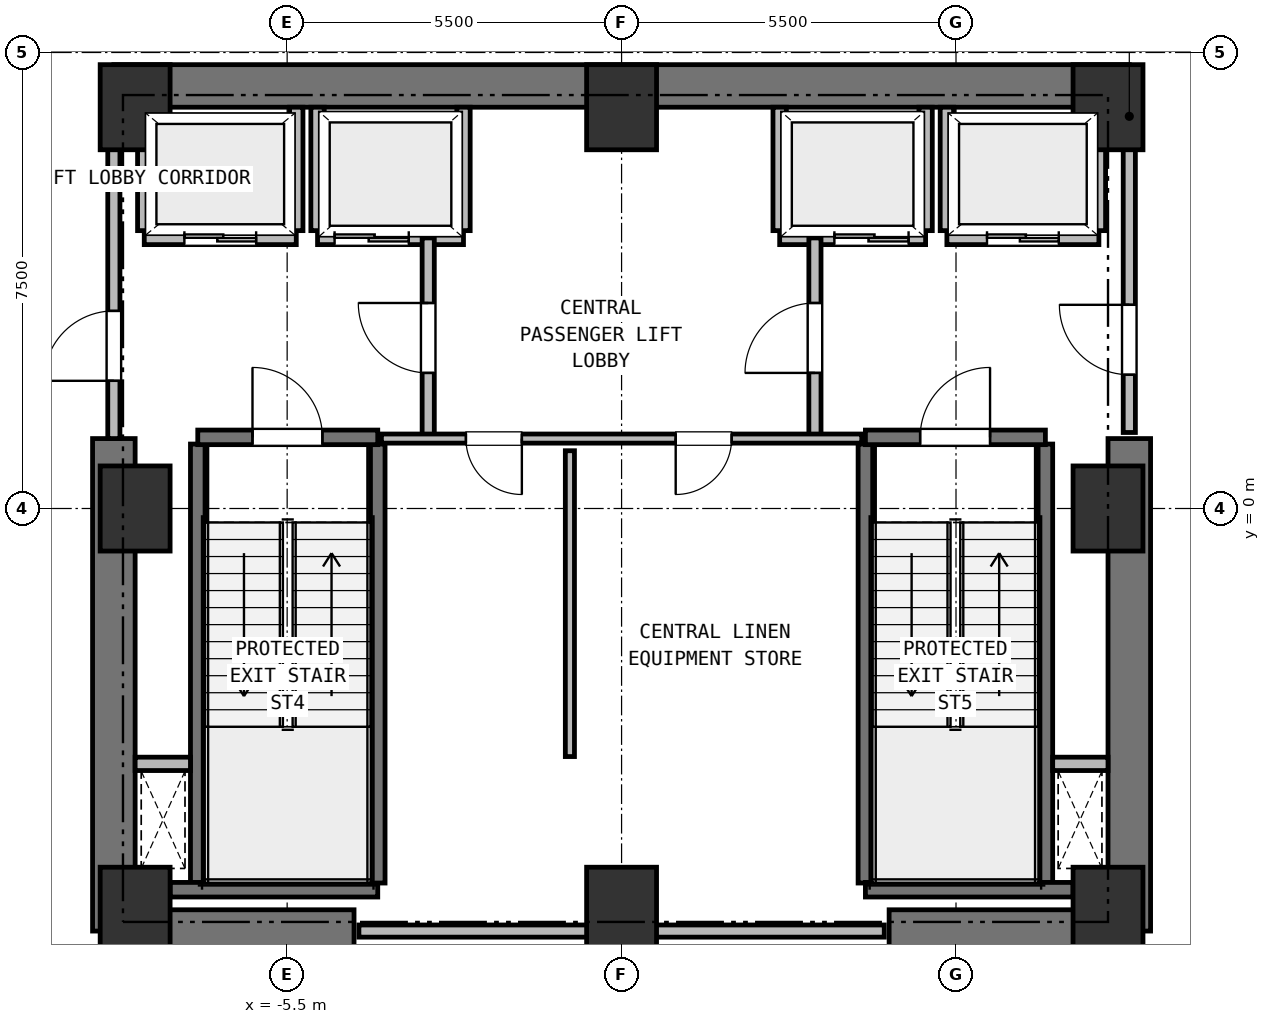
"""IFC4 building model, lengths in metres.
Left out: names, types, materials, properties, quantities, classifications, styles, units other than length and angle.
Written with IfcOpenShell. Run it as: python <this file> out.ifc"""

import sys

from ifc_helpers import new_model, si_unit, direction, frame, frame_2d, origin, origin_2d, place, context, subcontext, project, spatial, rectangle, extrude, element, fill, save


model = new_model("IFC4")
c1 = context("Model", 3, precision=1e-05, world=origin(), true_north=direction((0.0, 1.0)))
c2 = subcontext(c1, "Body", "Model", "MODEL_VIEW")
j1 = project(units=[si_unit("LENGTHUNIT", "METRE"), si_unit("PLANEANGLEUNIT", "RADIAN")], contexts=[c1])
p1 = place(None, origin())
s1 = spatial("IfcSite", under=j1, at=p1, CompositionType="ELEMENT")
p2 = place(p1, origin())
s2 = spatial("IfcBuilding", under=s1, at=p2, CompositionType="ELEMENT")
p3 = place(p2, frame((0.0, 0.0, -9.0)))
s3 = spatial("IfcBuildingStorey", under=s2, at=p3, CompositionType="ELEMENT", Elevation=-9.0)
for number, where, z_axis, x_axis in (
    (1, (-8.0, -6.6, 0.0), (0.0, 0.0, 1.0), (1.0, 0.0, 0.0)),
    (2, (0.0, -6.6, 0.0), (0.0, 0.0, 1.0), (1.0, 0.0, 0.0)),
    (3, (8.0, -6.6, 0.0), (0.0, 0.0, 1.0), (1.0, 0.0, 0.0)),
    (4, (8.0, 0.0, 0.0), (0.0, 0.0, 1.0), (1.0, 0.0, 0.0)),
    (5, (8.0, 6.6, 0.0), (0.0, 0.0, 1.0), (1.0, 0.0, 0.0)),
    (6, (0.0, 6.6, 0.0), (0.0, 0.0, 1.0), (1.0, 0.0, 0.0)),
    (7, (-8.0, 6.6, 0.0), (0.0, 0.0, 1.0), (1.0, 0.0, 0.0)),
    (8, (-8.0, 0.0, 0.0), (0.0, 0.0, 1.0), (1.0, 0.0, 0.0)),
):
    element("IfcColumn", number, at=place(p3, frame(where, z_axis=z_axis, x_axis=x_axis)), inside=s3, PredefinedType="COLUMN", context=c2, shape_type="SweptSolid", body=[
        extrude(rectangle(XDim=1.15, YDim=1.4, at=origin_2d()), origin(), (0.0, 0.0, 1.0), 4.5),
    ])
p4 = place(p3, frame((-8.35, 6.95, 0.0), z_axis=(0.0, 0.0, 1.0), x_axis=(1.0, 0.0, 0.0)))
e9 = element("IfcWall", 9, at=p4, inside=s3, PredefinedType="SHEAR", context=c2, shape_type="SweptSolid", body=[
    extrude(rectangle(XDim=16.7, YDim=0.7, at=frame_2d((8.35, 0.0))), origin(), (0.0, 0.0, 1.0), 4.2),
])
for number, where, z_axis, x_axis in (
    (10, (-8.35, -6.95, 0.0), (0.0, 0.0, 1.0), (1.0, 0.0, 0.0)),
    (11, (4.4, -6.95, 0.0), (0.0, 0.0, 1.0), (1.0, 0.0, 0.0)),
):
    element("IfcWall", number, at=place(p3, frame(where, z_axis=z_axis, x_axis=x_axis)), inside=s3, PredefinedType="SHEAR", context=c2, shape_type="SweptSolid", body=[
        extrude(rectangle(XDim=3.95, YDim=0.7, at=frame_2d((1.975, 0.0))), origin(), (0.0, 0.0, 1.0), 4.2),
    ])
for number, where, z_axis, x_axis in (
    (12, (-8.35, -6.95, 0.0), (0.0, 0.0, 1.0), (0.0, 1.0, 0.0)),
    (13, (8.35, -6.95, 0.0), (0.0, 0.0, 1.0), (0.0, 1.0, 0.0)),
):
    element("IfcWall", number, at=place(p3, frame(where, z_axis=z_axis, x_axis=x_axis)), inside=s3, PredefinedType="SHEAR", context=c2, shape_type="SweptSolid", body=[
        extrude(rectangle(XDim=8.1, YDim=0.7, at=frame_2d((4.05, 0.0))), origin(), (0.0, 0.0, 1.0), 4.2),
    ])
p5 = place(p3, frame((-6.97, -6.16, 0.0), z_axis=(0.0, 0.0, 1.0), x_axis=(0.0, 1.0, 0.0)))
e14 = element("IfcWall", 14, at=p5, inside=s3, PredefinedType="SHEAR", context=c2, shape_type="SweptSolid", body=[
    extrude(rectangle(XDim=7.22, YDim=0.24, at=frame_2d((3.61, 0.0))), origin(), (0.0, 0.0, 1.0), 4.2),
])
p6 = place(p3, frame((-7.425, -6.27, 0.0), z_axis=(0.0, 0.0, 1.0), x_axis=(1.0, 0.0, 0.0)))
e15 = element("IfcWall", 15, at=p6, inside=s3, PredefinedType="SHEAR", context=c2, shape_type="SweptSolid", body=[
    extrude(rectangle(XDim=3.415, YDim=0.24, at=frame_2d((1.708, 0.0))), origin(), (0.0, 0.0, 1.0), 4.2),
])
p7 = place(p3, frame((-4.01, -6.16, 0.0), z_axis=(0.0, 0.0, 1.0), x_axis=(0.0, 1.0, 0.0)))
e16 = element("IfcWall", 16, at=p7, inside=s3, PredefinedType="SHEAR", context=c2, shape_type="SweptSolid", body=[
    extrude(rectangle(XDim=7.22, YDim=0.24, at=frame_2d((3.61, 0.0))), origin(), (0.0, 0.0, 1.0), 4.2),
])
p8 = place(p3, frame((-6.97, 1.17, 0.0), z_axis=(0.0, 0.0, 1.0), x_axis=(1.0, 0.0, 0.0)))
e17 = element("IfcWall", 17, at=p8, inside=s3, PredefinedType="SHEAR", context=c2, shape_type="SweptSolid", body=[
    extrude(rectangle(XDim=2.96, YDim=0.24, at=frame_2d((1.48, 0.0))), origin(), (0.0, 0.0, 1.0), 4.2),
])
p9 = place(p8, frame((0.9, 0.0, 0.0)))
e18 = element("IfcOpeningElement", 18, at=p9, cuts=e17, PredefinedType="OPENING", context=c2, shape_type="SweptSolid", body=[
    extrude(rectangle(XDim=1.15, YDim=2.15, at=frame_2d((0.575, 1.075))), frame((0.0, 0.13, 0.0), z_axis=(0.0, -1.0, 0.0), x_axis=(1.0, 0.0, 0.0)), (0.0, 0.0, 1.0), 0.26),
])
for number, where, z_axis, x_axis in (
    (19, (4.01, -6.16, 0.0), (0.0, 0.0, 1.0), (0.0, 1.0, 0.0)),
    (20, (6.97, -6.16, 0.0), (0.0, 0.0, 1.0), (0.0, 1.0, 0.0)),
):
    element("IfcWall", number, at=place(p3, frame(where, z_axis=z_axis, x_axis=x_axis)), inside=s3, PredefinedType="SHEAR", context=c2, shape_type="SweptSolid", body=[
        extrude(rectangle(XDim=7.22, YDim=0.24, at=frame_2d((3.61, 0.0))), origin(), (0.0, 0.0, 1.0), 4.2),
    ])
p10 = place(p3, frame((4.01, -6.27, 0.0), z_axis=(0.0, 0.0, 1.0), x_axis=(1.0, 0.0, 0.0)))
e21 = element("IfcWall", 21, at=p10, inside=s3, PredefinedType="SHEAR", context=c2, shape_type="SweptSolid", body=[
    extrude(rectangle(XDim=3.415, YDim=0.24, at=frame_2d((1.708, 0.0))), origin(), (0.0, 0.0, 1.0), 4.2),
])
p11 = place(p3, frame((4.01, 1.17, 0.0), z_axis=(0.0, 0.0, 1.0), x_axis=(1.0, 0.0, 0.0)))
e22 = element("IfcWall", 22, at=p11, inside=s3, PredefinedType="SHEAR", context=c2, shape_type="SweptSolid", body=[
    extrude(rectangle(XDim=2.96, YDim=0.24, at=frame_2d((1.48, 0.0))), origin(), (0.0, 0.0, 1.0), 4.2),
])
p12 = place(p11, frame((0.9, 0.0, 0.0)))
e23 = element("IfcOpeningElement", 23, at=p12, cuts=e22, PredefinedType="OPENING", context=c2, shape_type="SweptSolid", body=[
    extrude(rectangle(XDim=1.15, YDim=2.15, at=frame_2d((0.575, 1.075))), frame((0.0, 0.13, 0.0), z_axis=(0.0, -1.0, 0.0), x_axis=(1.0, 0.0, 0.0)), (0.0, 0.0, 1.0), 0.26),
])
for number, where, z_axis, x_axis in (
    (24, (-8.0, -4.2, 0.0), (0.0, 0.0, 1.0), (1.0, 0.0, 0.0)),
    (25, (7.09, -4.2, 0.0), (0.0, 0.0, 1.0), (1.0, 0.0, 0.0)),
):
    element("IfcWall", number, at=place(p3, frame(where, z_axis=z_axis, x_axis=x_axis)), inside=s3, PredefinedType="PARTITIONING", context=c2, shape_type="SweptSolid", body=[
        extrude(rectangle(XDim=0.91, YDim=0.22, at=frame_2d((0.455, 0.0))), origin(), (0.0, 0.0, 1.0), 4.2),
    ])
p13 = place(p3, frame((-7.85, 4.45, 0.0), z_axis=(0.0, 0.0, 1.0), x_axis=(1.0, 0.0, 0.0)))
e26 = element("IfcWall", 26, at=p13, inside=s3, PredefinedType="PARTITIONING", context=c2, shape_type="SweptSolid", body=[
    extrude(rectangle(XDim=2.5, YDim=0.22, at=frame_2d((1.25, 0.0))), origin(), (0.0, 0.0, 1.0), 4.2),
])
p14 = place(p13, frame((0.66, 0.0, 0.0)))
e27 = element("IfcOpeningElement", 27, at=p14, cuts=e26, PredefinedType="OPENING", context=c2, shape_type="SweptSolid", body=[
    extrude(rectangle(XDim=1.18, YDim=2.15, at=frame_2d((0.59, 1.075))), frame((0.0, 0.12, 0.0), z_axis=(0.0, -1.0, 0.0), x_axis=(1.0, 0.0, 0.0)), (0.0, 0.0, 1.0), 0.24),
])
p15 = place(p3, frame((-7.85, 4.57, 0.0), z_axis=(0.0, 0.0, 1.0), x_axis=(0.0, 1.0, 0.0)))
e28 = element("IfcWall", 28, at=p15, inside=s3, PredefinedType="PARTITIONING", context=c2, shape_type="SweptSolid", body=[
    extrude(rectangle(XDim=2.03, YDim=0.22, at=frame_2d((1.015, 0.0))), origin(), (0.0, 0.0, 1.0), 3.78),
])
p16 = place(p3, frame((-5.35, 4.57, 0.0), z_axis=(0.0, 0.0, 1.0), x_axis=(0.0, 1.0, 0.0)))
e29 = element("IfcWall", 29, at=p16, inside=s3, PredefinedType="PARTITIONING", context=c2, shape_type="SweptSolid", body=[
    extrude(rectangle(XDim=2.03, YDim=0.22, at=frame_2d((1.015, 0.0))), origin(), (0.0, 0.0, 1.0), 4.2),
])
p17 = place(p3, frame((5.35, 4.45, 0.0), z_axis=(0.0, 0.0, 1.0), x_axis=(1.0, 0.0, 0.0)))
e30 = element("IfcWall", 30, at=p17, inside=s3, PredefinedType="PARTITIONING", context=c2, shape_type="SweptSolid", body=[
    extrude(rectangle(XDim=2.5, YDim=0.22, at=frame_2d((1.25, 0.0))), origin(), (0.0, 0.0, 1.0), 4.2),
])
p18 = place(p17, frame((0.66, 0.0, 0.0)))
e31 = element("IfcOpeningElement", 31, at=p18, cuts=e30, PredefinedType="OPENING", context=c2, shape_type="SweptSolid", body=[
    extrude(rectangle(XDim=1.18, YDim=2.15, at=frame_2d((0.59, 1.075))), frame((0.0, 0.12, 0.0), z_axis=(0.0, -1.0, 0.0), x_axis=(1.0, 0.0, 0.0)), (0.0, 0.0, 1.0), 0.24),
])
p19 = place(p3, frame((5.35, 4.57, 0.0), z_axis=(0.0, 0.0, 1.0), x_axis=(0.0, 1.0, 0.0)))
e32 = element("IfcWall", 32, at=p19, inside=s3, PredefinedType="PARTITIONING", context=c2, shape_type="SweptSolid", body=[
    extrude(rectangle(XDim=2.03, YDim=0.22, at=frame_2d((1.015, 0.0))), origin(), (0.0, 0.0, 1.0), 4.2),
])
p20 = place(p3, frame((7.85, 4.57, 0.0), z_axis=(0.0, 0.0, 1.0), x_axis=(0.0, 1.0, 0.0)))
e33 = element("IfcWall", 33, at=p20, inside=s3, PredefinedType="PARTITIONING", context=c2, shape_type="SweptSolid", body=[
    extrude(rectangle(XDim=2.03, YDim=0.22, at=frame_2d((1.015, 0.0))), origin(), (0.0, 0.0, 1.0), 3.78),
])
p21 = place(p3, frame((-5.0, 4.45, 0.0), z_axis=(0.0, 0.0, 1.0), x_axis=(1.0, 0.0, 0.0)))
e34 = element("IfcWall", 34, at=p21, inside=s3, PredefinedType="PARTITIONING", context=c2, shape_type="SweptSolid", body=[
    extrude(rectangle(XDim=2.4, YDim=0.22, at=frame_2d((1.2, 0.0))), origin(), (0.0, 0.0, 1.0), 4.2),
])
p22 = place(p21, frame((0.28, 0.0, 0.0)))
e35 = element("IfcOpeningElement", 35, at=p22, cuts=e34, PredefinedType="OPENING", context=c2, shape_type="SweptSolid", body=[
    extrude(rectangle(XDim=1.22, YDim=2.15, at=frame_2d((0.61, 1.075))), frame((0.0, 0.12, 0.0), z_axis=(0.0, -1.0, 0.0), x_axis=(1.0, 0.0, 0.0)), (0.0, 0.0, 1.0), 0.24),
])
for number, where, z_axis, x_axis in (
    (36, (-5.0, 4.57, 0.0), (0.0, 0.0, 1.0), (0.0, 1.0, 0.0)),
    (37, (-2.6, 4.57, 0.0), (0.0, 0.0, 1.0), (0.0, 1.0, 0.0)),
):
    element("IfcWall", number, at=place(p3, frame(where, z_axis=z_axis, x_axis=x_axis)), inside=s3, PredefinedType="PARTITIONING", context=c2, shape_type="SweptSolid", body=[
        extrude(rectangle(XDim=2.03, YDim=0.22, at=frame_2d((1.015, 0.0))), origin(), (0.0, 0.0, 1.0), 4.2),
    ])
p23 = place(p3, frame((2.6, 4.45, 0.0), z_axis=(0.0, 0.0, 1.0), x_axis=(1.0, 0.0, 0.0)))
e38 = element("IfcWall", 38, at=p23, inside=s3, PredefinedType="PARTITIONING", context=c2, shape_type="SweptSolid", body=[
    extrude(rectangle(XDim=2.4, YDim=0.22, at=frame_2d((1.2, 0.0))), origin(), (0.0, 0.0, 1.0), 4.2),
])
p24 = place(p23, frame((0.9, 0.0, 0.0)))
e39 = element("IfcOpeningElement", 39, at=p24, cuts=e38, PredefinedType="OPENING", context=c2, shape_type="SweptSolid", body=[
    extrude(rectangle(XDim=1.22, YDim=2.15, at=frame_2d((0.61, 1.075))), frame((0.0, 0.12, 0.0), z_axis=(0.0, -1.0, 0.0), x_axis=(1.0, 0.0, 0.0)), (0.0, 0.0, 1.0), 0.24),
])
for number, where, z_axis, x_axis in (
    (40, (2.6, 4.57, 0.0), (0.0, 0.0, 1.0), (0.0, 1.0, 0.0)),
    (41, (5.0, 4.57, 0.0), (0.0, 0.0, 1.0), (0.0, 1.0, 0.0)),
):
    element("IfcWall", number, at=place(p3, frame(where, z_axis=z_axis, x_axis=x_axis)), inside=s3, PredefinedType="PARTITIONING", context=c2, shape_type="SweptSolid", body=[
        extrude(rectangle(XDim=2.03, YDim=0.22, at=frame_2d((1.015, 0.0))), origin(), (0.0, 0.0, 1.0), 4.2),
    ])
p25 = place(p3, frame((-3.18, 1.15, 0.0), z_axis=(0.0, 0.0, 1.0), x_axis=(0.0, 1.0, 0.0)))
e42 = element("IfcWall", 42, at=p25, inside=s3, PredefinedType="PARTITIONING", context=c2, shape_type="SweptSolid", body=[
    extrude(rectangle(XDim=3.3, YDim=0.2, at=frame_2d((1.65, 0.0))), origin(), (0.0, 0.0, 1.0), 4.2),
])
p26 = place(p25, frame((1.08, 0.0, 0.0)))
e43 = element("IfcOpeningElement", 43, at=p26, cuts=e42, PredefinedType="OPENING", context=c2, shape_type="SweptSolid", body=[
    extrude(rectangle(XDim=1.15, YDim=2.15, at=frame_2d((0.575, 1.075))), frame((0.0, 0.11, 0.0), z_axis=(0.0, -1.0, 0.0), x_axis=(1.0, 0.0, 0.0)), (0.0, 0.0, 1.0), 0.22),
])
p27 = place(p3, frame((3.18, 1.15, 0.0), z_axis=(0.0, 0.0, 1.0), x_axis=(0.0, 1.0, 0.0)))
e44 = element("IfcWall", 44, at=p27, inside=s3, PredefinedType="PARTITIONING", context=c2, shape_type="SweptSolid", body=[
    extrude(rectangle(XDim=3.3, YDim=0.2, at=frame_2d((1.65, 0.0))), origin(), (0.0, 0.0, 1.0), 4.2),
])
p28 = place(p27, frame((1.08, 0.0, 0.0)))
e45 = element("IfcOpeningElement", 45, at=p28, cuts=e44, PredefinedType="OPENING", context=c2, shape_type="SweptSolid", body=[
    extrude(rectangle(XDim=1.15, YDim=2.15, at=frame_2d((0.575, 1.075))), frame((0.0, 0.11, 0.0), z_axis=(0.0, -1.0, 0.0), x_axis=(1.0, 0.0, 0.0)), (0.0, 0.0, 1.0), 0.22),
])
p29 = place(p3, frame((-8.35, 1.15, 0.0), z_axis=(0.0, 0.0, 1.0), x_axis=(0.0, 1.0, 0.0)))
e46 = element("IfcWall", 46, at=p29, inside=s3, PredefinedType="PARTITIONING", context=c2, shape_type="SweptSolid", body=[
    extrude(rectangle(XDim=5.4, YDim=0.2, at=frame_2d((2.7, 0.0))), origin(), (0.0, 0.0, 1.0), 4.2),
])
p30 = place(p29, frame((0.95, 0.0, 0.0)))
e47 = element("IfcOpeningElement", 47, at=p30, cuts=e46, PredefinedType="OPENING", context=c2, shape_type="SweptSolid", body=[
    extrude(rectangle(XDim=1.15, YDim=2.15, at=frame_2d((0.575, 1.075))), frame((0.0, 0.11, 0.0), z_axis=(0.0, -1.0, 0.0), x_axis=(1.0, 0.0, 0.0)), (0.0, 0.0, 1.0), 0.22),
])
p31 = place(p3, frame((8.35, 1.25, 0.0), z_axis=(0.0, 0.0, 1.0), x_axis=(0.0, 1.0, 0.0)))
e48 = element("IfcWall", 48, at=p31, inside=s3, PredefinedType="PARTITIONING", context=c2, shape_type="SweptSolid", body=[
    extrude(rectangle(XDim=5.3, YDim=0.2, at=frame_2d((2.65, 0.0))), origin(), (0.0, 0.0, 1.0), 4.2),
])
p32 = place(p31, frame((0.95, 0.0, 0.0)))
e49 = element("IfcOpeningElement", 49, at=p32, cuts=e48, PredefinedType="OPENING", context=c2, shape_type="SweptSolid", body=[
    extrude(rectangle(XDim=1.15, YDim=2.15, at=frame_2d((0.575, 1.075))), frame((0.0, 0.11, 0.0), z_axis=(0.0, -1.0, 0.0), x_axis=(1.0, 0.0, 0.0)), (0.0, 0.0, 1.0), 0.22),
])
p33 = place(p3, frame((3.95, 1.15, 0.0), z_axis=(0.0, 0.0, 1.0), x_axis=(-1.0, 0.0, 0.0)))
e50 = element("IfcWall", 50, at=p33, inside=s3, PredefinedType="PARTITIONING", context=c2, shape_type="SweptSolid", body=[
    extrude(rectangle(XDim=7.9, YDim=0.15, at=frame_2d((3.95, 0.0))), origin(), (0.0, 0.0, 1.0), 4.2),
])
p34 = place(p33, frame((5.59, 0.0, 0.0)))
e51 = element("IfcOpeningElement", 51, at=p34, cuts=e50, PredefinedType="OPENING", context=c2, shape_type="SweptSolid", body=[
    extrude(rectangle(XDim=0.92, YDim=2.05, at=frame_2d((0.46, 1.025))), frame((0.0, 0.085, 0.0), z_axis=(0.0, -1.0, 0.0), x_axis=(1.0, 0.0, 0.0)), (0.0, 0.0, 1.0), 0.17),
])
p35 = place(p33, frame((2.14, 0.0, 0.0)))
e52 = element("IfcOpeningElement", 52, at=p35, cuts=e50, PredefinedType="OPENING", context=c2, shape_type="SweptSolid", body=[
    extrude(rectangle(XDim=0.92, YDim=2.05, at=frame_2d((0.46, 1.025))), frame((0.0, 0.085, 0.0), z_axis=(0.0, -1.0, 0.0), x_axis=(1.0, 0.0, 0.0)), (0.0, 0.0, 1.0), 0.17),
])
p36 = place(p3, frame((-4.32, -6.95, 0.0), z_axis=(0.0, 0.0, 1.0), x_axis=(1.0, 0.0, 0.0)))
e53 = element("IfcWall", 53, at=p36, inside=s3, PredefinedType="PARTITIONING", context=c2, shape_type="SweptSolid", body=[
    extrude(rectangle(XDim=8.64, YDim=0.2, at=frame_2d((4.32, 0.0))), origin(), (0.0, 0.0, 1.0), 4.2),
])
p37 = place(p3, frame((-0.85, -4.08, 0.0), z_axis=(0.0, 0.0, 1.0), x_axis=(0.0, 1.0, 0.0)))
e54 = element("IfcWall", 54, at=p37, inside=s3, PredefinedType="PARTITIONING", context=c2, shape_type="SweptSolid", body=[
    extrude(rectangle(XDim=5.03, YDim=0.15, at=frame_2d((2.515, 0.0))), origin(), (0.0, 0.0, 1.0), 4.2),
])
p38 = place(p9, origin())
e55 = element("IfcDoor", 55, at=p38, inside=s3, OperationType="SINGLE_SWING_LEFT", PredefinedType="DOOR", context=c2, shape_type="SweptSolid", body=[
    extrude(rectangle(XDim=1.15, YDim=2.15, at=frame_2d((0.575, 1.075))), frame((0.0, 0.025, 0.0), z_axis=(0.0, -1.0, 0.0), x_axis=(1.0, 0.0, 0.0)), (0.0, 0.0, 1.0), 0.05),
])
fill(e18, e55)
p39 = place(p12, origin())
e56 = element("IfcDoor", 56, at=p39, inside=s3, OperationType="SINGLE_SWING_RIGHT", PredefinedType="DOOR", context=c2, shape_type="SweptSolid", body=[
    extrude(rectangle(XDim=1.15, YDim=2.15, at=frame_2d((0.575, 1.075))), frame((0.0, 0.025, 0.0), z_axis=(0.0, -1.0, 0.0), x_axis=(1.0, 0.0, 0.0)), (0.0, 0.0, 1.0), 0.05),
])
fill(e23, e56)
p40 = place(p14, origin())
e57 = element("IfcDoor", 57, at=p40, inside=s3, OperationType="DOUBLE_DOOR_SLIDING", PredefinedType="DOOR", context=c2, shape_type="SweptSolid", body=[
    extrude(rectangle(XDim=1.18, YDim=2.15, at=frame_2d((0.59, 1.075))), frame((0.0, 0.025, 0.0), z_axis=(0.0, -1.0, 0.0), x_axis=(1.0, 0.0, 0.0)), (0.0, 0.0, 1.0), 0.05),
])
fill(e27, e57)
p41 = place(p18, origin())
e58 = element("IfcDoor", 58, at=p41, inside=s3, OperationType="DOUBLE_DOOR_SLIDING", PredefinedType="DOOR", context=c2, shape_type="SweptSolid", body=[
    extrude(rectangle(XDim=1.18, YDim=2.15, at=frame_2d((0.59, 1.075))), frame((0.0, 0.025, 0.0), z_axis=(0.0, -1.0, 0.0), x_axis=(1.0, 0.0, 0.0)), (0.0, 0.0, 1.0), 0.05),
])
fill(e31, e58)
p42 = place(p22, origin())
e59 = element("IfcDoor", 59, at=p42, inside=s3, OperationType="DOUBLE_DOOR_SLIDING", PredefinedType="DOOR", context=c2, shape_type="SweptSolid", body=[
    extrude(rectangle(XDim=1.22, YDim=2.15, at=frame_2d((0.61, 1.075))), frame((0.0, 0.025, 0.0), z_axis=(0.0, -1.0, 0.0), x_axis=(1.0, 0.0, 0.0)), (0.0, 0.0, 1.0), 0.05),
])
fill(e35, e59)
p43 = place(p24, origin())
e60 = element("IfcDoor", 60, at=p43, inside=s3, OperationType="DOUBLE_DOOR_SLIDING", PredefinedType="DOOR", context=c2, shape_type="SweptSolid", body=[
    extrude(rectangle(XDim=1.22, YDim=2.15, at=frame_2d((0.61, 1.075))), frame((0.0, 0.025, 0.0), z_axis=(0.0, -1.0, 0.0), x_axis=(1.0, 0.0, 0.0)), (0.0, 0.0, 1.0), 0.05),
])
fill(e39, e60)
p44 = place(p26, origin())
e61 = element("IfcDoor", 61, at=p44, inside=s3, OperationType="SINGLE_SWING_RIGHT", PredefinedType="DOOR", context=c2, shape_type="SweptSolid", body=[
    extrude(rectangle(XDim=1.15, YDim=2.15, at=frame_2d((0.575, 1.075))), frame((0.0, 0.025, 0.0), z_axis=(0.0, -1.0, 0.0), x_axis=(1.0, 0.0, 0.0)), (0.0, 0.0, 1.0), 0.05),
])
fill(e43, e61)
p45 = place(p28, origin())
e62 = element("IfcDoor", 62, at=p45, inside=s3, OperationType="SINGLE_SWING_LEFT", PredefinedType="DOOR", context=c2, shape_type="SweptSolid", body=[
    extrude(rectangle(XDim=1.15, YDim=2.15, at=frame_2d((0.575, 1.075))), frame((0.0, 0.025, 0.0), z_axis=(0.0, -1.0, 0.0), x_axis=(1.0, 0.0, 0.0)), (0.0, 0.0, 1.0), 0.05),
])
fill(e45, e62)
p46 = place(p30, origin())
e63 = element("IfcDoor", 63, at=p46, inside=s3, OperationType="SINGLE_SWING_LEFT", PredefinedType="DOOR", context=c2, shape_type="SweptSolid", body=[
    extrude(rectangle(XDim=1.15, YDim=2.15, at=frame_2d((0.575, 1.075))), frame((0.0, 0.025, 0.0), z_axis=(0.0, -1.0, 0.0), x_axis=(1.0, 0.0, 0.0)), (0.0, 0.0, 1.0), 0.05),
])
fill(e47, e63)
p47 = place(p32, origin())
e64 = element("IfcDoor", 64, at=p47, inside=s3, OperationType="SINGLE_SWING_RIGHT", PredefinedType="DOOR", context=c2, shape_type="SweptSolid", body=[
    extrude(rectangle(XDim=1.15, YDim=2.15, at=frame_2d((0.575, 1.075))), frame((0.0, 0.025, 0.0), z_axis=(0.0, -1.0, 0.0), x_axis=(1.0, 0.0, 0.0)), (0.0, 0.0, 1.0), 0.05),
])
fill(e49, e64)
p48 = place(p34, origin())
e65 = element("IfcDoor", 65, at=p48, inside=s3, OperationType="SINGLE_SWING_LEFT", PredefinedType="DOOR", context=c2, shape_type="SweptSolid", body=[
    extrude(rectangle(XDim=0.92, YDim=2.05, at=frame_2d((0.46, 1.025))), frame((0.0, 0.025, 0.0), z_axis=(0.0, -1.0, 0.0), x_axis=(1.0, 0.0, 0.0)), (0.0, 0.0, 1.0), 0.05),
])
fill(e51, e65)
p49 = place(p35, origin())
e66 = element("IfcDoor", 66, at=p49, inside=s3, OperationType="SINGLE_SWING_RIGHT", PredefinedType="DOOR", context=c2, shape_type="SweptSolid", body=[
    extrude(rectangle(XDim=0.92, YDim=2.05, at=frame_2d((0.46, 1.025))), frame((0.0, 0.025, 0.0), z_axis=(0.0, -1.0, 0.0), x_axis=(1.0, 0.0, 0.0)), (0.0, 0.0, 1.0), 0.05),
])
fill(e52, e66)
save(model, sys.argv[1])
